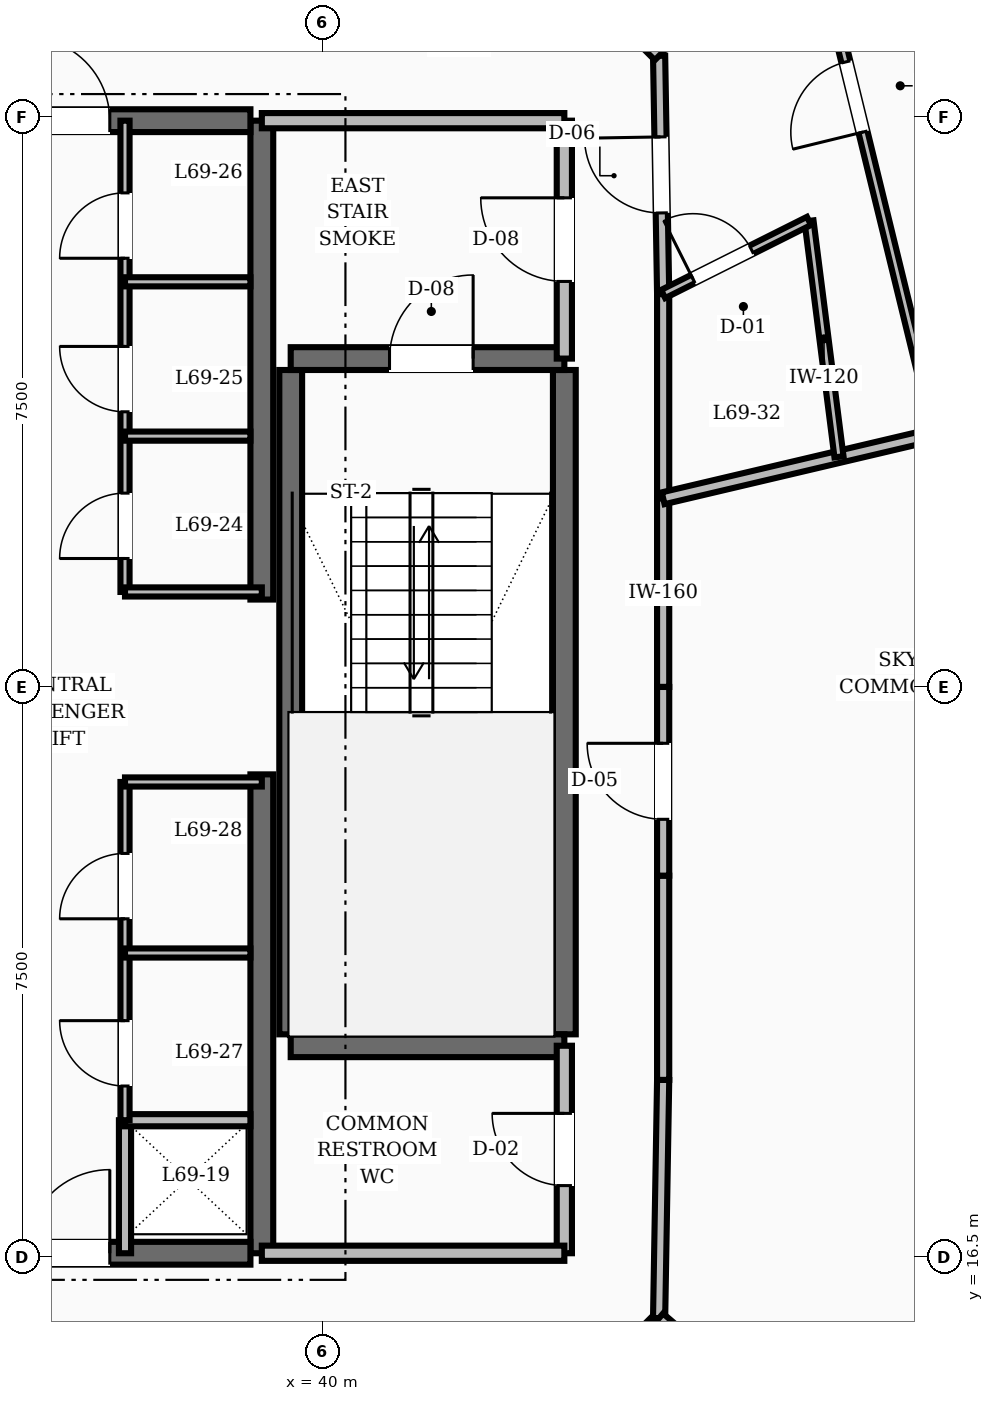
"""IFC4 building model, lengths in metres.
Left out: names, types, materials, properties, quantities, classifications, styles, units other than length and angle.
Written with IfcOpenShell. Run it as: python <this file> out.ifc"""

import sys

from ifc_helpers import new_model, si_unit, direction, frame, frame_2d, origin, place, context, subcontext, project, spatial, rectangle, extrude, element, fill, save


model = new_model("IFC4")
c1 = context("Model", 3, precision=1e-05, world=origin(), true_north=direction((0.0, 1.0)))
c2 = subcontext(c1, "Body", "Model", "MODEL_VIEW")
j1 = project(units=[si_unit("LENGTHUNIT", "METRE"), si_unit("PLANEANGLEUNIT", "RADIAN")], contexts=[c1])
p1 = place(None, origin())
s1 = spatial("IfcSite", under=j1, at=p1, CompositionType="ELEMENT")
p2 = place(p1, origin())
s2 = spatial("IfcBuilding", under=s1, at=p2, CompositionType="ELEMENT")
p3 = place(p2, frame((0.0, 0.0, 265.2)))
s3 = spatial("IfcBuildingStorey", under=s2, at=p3, CompositionType="ELEMENT", Elevation=265.2)
for number, where, z_axis, x_axis in (
    (1, (39.2, 16.55, 0.0), (0.0, 0.0, 1.0), (0.0, 1.0, 0.0)),
    (2, (39.2, 25.15, 0.0), (0.0, 0.0, 1.0), (0.0, 1.0, 0.0)),
):
    element("IfcWall", number, at=place(p3, frame(where, z_axis=z_axis, x_axis=x_axis)), inside=s3, PredefinedType="SHEAR", context=c2, shape_type="SweptSolid", body=[
        extrude(rectangle(XDim=6.3, YDim=0.3, at=frame_2d((3.15, 0.0))), origin(), (0.0, 0.0, 1.0), 3.6),
    ])
p4 = place(p3, frame((35.8, 16.55, 0.0), z_axis=(0.0, 0.0, 1.0), x_axis=(1.0, 0.0, 0.0)))
e3 = element("IfcWall", 3, at=p4, inside=s3, PredefinedType="SHEAR", context=c2, shape_type="SweptSolid", body=[
    extrude(rectangle(XDim=3.25, YDim=0.3, at=frame_2d((1.625, 0.0))), origin(), (0.0, 0.0, 1.0), 3.6),
])
p5 = place(p4, frame((0.3, 0.0, 0.0)))
e4 = element("IfcOpeningElement", 4, at=p5, cuts=e3, PredefinedType="OPENING", context=c2, shape_type="SweptSolid", body=[
    extrude(rectangle(XDim=1.1, YDim=2.1, at=frame_2d((0.55, 1.05))), frame((0.0, 0.16, 0.0), z_axis=(0.0, -1.0, 0.0), x_axis=(1.0, 0.0, 0.0)), (0.0, 0.0, 1.0), 0.32),
])
p6 = place(p3, frame((35.8, 31.45, 0.0), z_axis=(0.0, 0.0, 1.0), x_axis=(1.0, 0.0, 0.0)))
e5 = element("IfcWall", 5, at=p6, inside=s3, PredefinedType="SHEAR", context=c2, shape_type="SweptSolid", body=[
    extrude(rectangle(XDim=3.25, YDim=0.3, at=frame_2d((1.625, 0.0))), origin(), (0.0, 0.0, 1.0), 3.6),
])
p7 = place(p6, frame((0.3, 0.0, 0.0)))
e6 = element("IfcOpeningElement", 6, at=p7, cuts=e5, PredefinedType="OPENING", context=c2, shape_type="SweptSolid", body=[
    extrude(rectangle(XDim=1.1, YDim=2.1, at=frame_2d((0.55, 1.05))), frame((0.0, 0.16, 0.0), z_axis=(0.0, -1.0, 0.0), x_axis=(1.0, 0.0, 0.0)), (0.0, 0.0, 1.0), 0.32),
])
for number, where, z_axis, x_axis in (
    (7, (43.18, 19.43, 0.0), (0.0, 0.0, 1.0), (0.0, 1.0, 0.0)),
    (8, (39.58, 19.43, 0.0), (0.0, 0.0, 1.0), (0.0, 1.0, 0.0)),
):
    element("IfcWall", number, at=place(p3, frame(where, z_axis=z_axis, x_axis=x_axis)), inside=s3, PredefinedType="SHEAR", context=c2, shape_type="SweptSolid", body=[
        extrude(rectangle(XDim=8.74, YDim=0.3, at=frame_2d((4.37, 0.0))), origin(), (0.0, 0.0, 1.0), 3.6),
    ])
p8 = place(p3, frame((39.58, 19.28, 0.0), z_axis=(0.0, 0.0, 1.0), x_axis=(1.0, 0.0, 0.0)))
e9 = element("IfcWall", 9, at=p8, inside=s3, PredefinedType="SHEAR", context=c2, shape_type="SweptSolid", body=[
    extrude(rectangle(XDim=3.6, YDim=0.3, at=frame_2d((1.8, 0.0))), origin(), (0.0, 0.0, 1.0), 3.6),
])
p9 = place(p3, frame((39.58, 28.32, 0.0), z_axis=(0.0, 0.0, 1.0), x_axis=(1.0, 0.0, 0.0)))
e10 = element("IfcWall", 10, at=p9, inside=s3, PredefinedType="SHEAR", context=c2, shape_type="SweptSolid", body=[
    extrude(rectangle(XDim=3.6, YDim=0.3, at=frame_2d((1.8, 0.0))), origin(), (0.0, 0.0, 1.0), 3.6),
])
p10 = place(p9, frame((1.3, 0.0, 0.0)))
e11 = element("IfcOpeningElement", 11, at=p10, cuts=e10, PredefinedType="OPENING", context=c2, shape_type="SweptSolid", body=[
    extrude(rectangle(XDim=1.1, YDim=2.1, at=frame_2d((0.55, 1.05))), frame((0.0, 0.16, 0.0), z_axis=(0.0, -1.0, 0.0), x_axis=(1.0, 0.0, 0.0)), (0.0, 0.0, 1.0), 0.32),
])
p11 = place(p3, frame((43.18, 28.32, 0.0), z_axis=(0.0, 0.0, 1.0), x_axis=(0.0, 1.0, 0.0)))
e12 = element("IfcWall", 12, at=p11, inside=s3, PredefinedType="SOLIDWALL", context=c2, shape_type="SweptSolid", body=[
    extrude(rectangle(XDim=3.13, YDim=0.2, at=frame_2d((1.565, 0.0))), origin(), (0.0, 0.0, 1.0), 2.87),
])
p12 = place(p11, frame((1.015, 0.0, 0.0)))
e13 = element("IfcOpeningElement", 13, at=p12, cuts=e12, PredefinedType="OPENING", context=c2, shape_type="SweptSolid", body=[
    extrude(rectangle(XDim=1.1, YDim=2.1, at=frame_2d((0.55, 1.05))), frame((0.0, 0.11, 0.0), z_axis=(0.0, -1.0, 0.0), x_axis=(1.0, 0.0, 0.0)), (0.0, 0.0, 1.0), 0.22),
])
p13 = place(p3, frame((39.2, 31.45, 0.0), z_axis=(0.0, 0.0, 1.0), x_axis=(1.0, 0.0, 0.0)))
e14 = element("IfcWall", 14, at=p13, inside=s3, PredefinedType="SOLIDWALL", context=c2, shape_type="SweptSolid", body=[
    extrude(rectangle(XDim=3.98, YDim=0.2, at=frame_2d((1.99, 0.0))), origin(), (0.0, 0.0, 1.0), 2.87),
])
p14 = place(p3, frame((43.18, 16.55, 0.0), z_axis=(0.0, 0.0, 1.0), x_axis=(0.0, 1.0, 0.0)))
e15 = element("IfcWall", 15, at=p14, inside=s3, PredefinedType="SOLIDWALL", context=c2, shape_type="SweptSolid", body=[
    extrude(rectangle(XDim=2.73, YDim=0.2, at=frame_2d((1.365, 0.0))), origin(), (0.0, 0.0, 1.0), 2.87),
])
p15 = place(p14, frame((0.89, 0.0, 0.0)))
e16 = element("IfcOpeningElement", 16, at=p15, cuts=e15, PredefinedType="OPENING", context=c2, shape_type="SweptSolid", body=[
    extrude(rectangle(XDim=0.95, YDim=2.1, at=frame_2d((0.475, 1.05))), frame((0.0, 0.11, 0.0), z_axis=(0.0, -1.0, 0.0), x_axis=(1.0, 0.0, 0.0)), (0.0, 0.0, 1.0), 0.22),
])
p16 = place(p3, frame((39.2, 16.55, 0.0), z_axis=(0.0, 0.0, 1.0), x_axis=(1.0, 0.0, 0.0)))
e17 = element("IfcWall", 17, at=p16, inside=s3, PredefinedType="SOLIDWALL", context=c2, shape_type="SweptSolid", body=[
    extrude(rectangle(XDim=3.98, YDim=0.2, at=frame_2d((1.99, 0.0))), origin(), (0.0, 0.0, 1.0), 2.87),
])
p17 = place(p3, frame((37.4, 16.55, 0.0), z_axis=(0.0, 0.0, 1.0), x_axis=(0.0, 1.0, 0.0)))
e18 = element("IfcWall", 18, at=p17, inside=s3, PredefinedType="SOLIDWALL", context=c2, shape_type="SweptSolid", body=[
    extrude(rectangle(XDim=1.75, YDim=0.16, at=frame_2d((0.875, 0.0))), origin(), (0.0, 0.0, 1.0), 2.87),
])
p18 = place(p3, frame((37.4, 18.3, 0.0), z_axis=(0.0, 0.0, 1.0), x_axis=(1.0, 0.0, 0.0)))
e19 = element("IfcWall", 19, at=p18, inside=s3, PredefinedType="SOLIDWALL", context=c2, shape_type="SweptSolid", body=[
    extrude(rectangle(XDim=1.65, YDim=0.16, at=frame_2d((0.825, 0.0))), origin(), (0.0, 0.0, 1.0), 2.87),
])
p19 = place(p3, frame((37.4, 25.25, 0.0), z_axis=(0.0, 0.0, 1.0), x_axis=(0.0, 1.0, 0.0)))
e20 = element("IfcWall", 20, at=p19, inside=s3, PredefinedType="PARTITIONING", context=c2, shape_type="SweptSolid", body=[
    extrude(rectangle(XDim=6.2, YDim=0.12, at=frame_2d((3.1, 0.0))), origin(), (0.0, 0.0, 1.0), 2.87),
])
p20 = place(p19, frame((0.44, 0.0, 0.0)))
e21 = element("IfcOpeningElement", 21, at=p20, cuts=e20, PredefinedType="OPENING", context=c2, shape_type="SweptSolid", body=[
    extrude(rectangle(XDim=0.86, YDim=2.1, at=frame_2d((0.43, 1.05))), frame((0.0, 0.07, 0.0), z_axis=(0.0, -1.0, 0.0), x_axis=(1.0, 0.0, 0.0)), (0.0, 0.0, 1.0), 0.14),
])
p21 = place(p19, frame((2.37, 0.0, 0.0)))
e22 = element("IfcOpeningElement", 22, at=p21, cuts=e20, PredefinedType="OPENING", context=c2, shape_type="SweptSolid", body=[
    extrude(rectangle(XDim=0.86, YDim=2.1, at=frame_2d((0.43, 1.05))), frame((0.0, 0.07, 0.0), z_axis=(0.0, -1.0, 0.0), x_axis=(1.0, 0.0, 0.0)), (0.0, 0.0, 1.0), 0.14),
])
p22 = place(p19, frame((4.39, 0.0, 0.0)))
e23 = element("IfcOpeningElement", 23, at=p22, cuts=e20, PredefinedType="OPENING", context=c2, shape_type="SweptSolid", body=[
    extrude(rectangle(XDim=0.86, YDim=2.1, at=frame_2d((0.43, 1.05))), frame((0.0, 0.07, 0.0), z_axis=(0.0, -1.0, 0.0), x_axis=(1.0, 0.0, 0.0)), (0.0, 0.0, 1.0), 0.14),
])
p23 = place(p3, frame((37.4, 25.25, 0.0), z_axis=(0.0, 0.0, 1.0), x_axis=(1.0, 0.0, 0.0)))
e24 = element("IfcWall", 24, at=p23, inside=s3, PredefinedType="PARTITIONING", context=c2, shape_type="SweptSolid", body=[
    extrude(rectangle(XDim=1.8, YDim=0.12, at=frame_2d((0.9, 0.0))), origin(), (0.0, 0.0, 1.0), 2.87),
])
p24 = place(p3, frame((37.4, 18.3, 0.0), z_axis=(0.0, 0.0, 1.0), x_axis=(0.0, 1.0, 0.0)))
e25 = element("IfcWall", 25, at=p24, inside=s3, PredefinedType="PARTITIONING", context=c2, shape_type="SweptSolid", body=[
    extrude(rectangle(XDim=4.45, YDim=0.12, at=frame_2d((2.225, 0.0))), origin(), (0.0, 0.0, 1.0), 2.87),
])
p25 = place(p24, frame((0.45, 0.0, 0.0)))
e26 = element("IfcOpeningElement", 26, at=p25, cuts=e25, PredefinedType="OPENING", context=c2, shape_type="SweptSolid", body=[
    extrude(rectangle(XDim=0.86, YDim=2.1, at=frame_2d((0.43, 1.05))), frame((0.0, 0.07, 0.0), z_axis=(0.0, -1.0, 0.0), x_axis=(1.0, 0.0, 0.0)), (0.0, 0.0, 1.0), 0.14),
])
p26 = place(p24, frame((2.65, 0.0, 0.0)))
e27 = element("IfcOpeningElement", 27, at=p26, cuts=e25, PredefinedType="OPENING", context=c2, shape_type="SweptSolid", body=[
    extrude(rectangle(XDim=0.86, YDim=2.1, at=frame_2d((0.43, 1.05))), frame((0.0, 0.07, 0.0), z_axis=(0.0, -1.0, 0.0), x_axis=(1.0, 0.0, 0.0)), (0.0, 0.0, 1.0), 0.14),
])
p27 = place(p3, frame((37.4, 22.75, 0.0), z_axis=(0.0, 0.0, 1.0), x_axis=(1.0, 0.0, 0.0)))
e28 = element("IfcWall", 28, at=p27, inside=s3, PredefinedType="PARTITIONING", context=c2, shape_type="SweptSolid", body=[
    extrude(rectangle(XDim=1.8, YDim=0.12, at=frame_2d((0.9, 0.0))), origin(), (0.0, 0.0, 1.0), 2.87),
])
for number, where, z_axis, x_axis in (
    (29, (37.4, 27.3, 0.0), (0.0, 0.0, 1.0), (1.0, 0.0, 0.0)),
    (30, (37.4, 29.33, 0.0), (0.0, 0.0, 1.0), (1.0, 0.0, 0.0)),
    (31, (37.4, 20.5, 0.0), (0.0, 0.0, 1.0), (1.0, 0.0, 0.0)),
):
    element("IfcWall", number, at=place(p3, frame(where, z_axis=z_axis, x_axis=x_axis)), inside=s3, PredefinedType="PARTITIONING", context=c2, shape_type="SweptSolid", body=[
        extrude(rectangle(XDim=1.65, YDim=0.12, at=frame_2d((0.825, 0.0))), origin(), (0.0, 0.0, 1.0), 2.87),
    ])
p28 = place(p3, frame((44.48, 24.0, 0.0), z_axis=(0.0, 0.0, 1.0), x_axis=(0.0, 1.0, 0.0)))
e32 = element("IfcWall", 32, at=p28, inside=s3, PredefinedType="SOLIDWALL", context=c2, shape_type="SweptSolid", body=[
    extrude(rectangle(XDim=2.482, YDim=0.16, at=frame_2d((1.241, 0.0))), origin(), (0.0, 0.0, 1.0), 2.87),
])
p29 = place(p3, frame((44.48, 26.482, 0.0), z_axis=(0.0, 0.0, 1.0), x_axis=(0.0, 1.0, 0.0)))
e33 = element("IfcWall", 33, at=p29, inside=s3, PredefinedType="SOLIDWALL", context=c2, shape_type="SweptSolid", body=[
    extrude(rectangle(XDim=2.687, YDim=0.16, at=frame_2d((1.344, 0.0))), origin(), (0.0, 0.0, 1.0), 2.87),
])
p30 = place(p3, frame((44.48, 29.169, 0.0), z_axis=(0.0, 0.0, 1.0), x_axis=(-0.016981035134, 0.999855811828, 0.0)))
e34 = element("IfcWall", 34, at=p30, inside=s3, PredefinedType="SOLIDWALL", context=c2, shape_type="SweptSolid", body=[
    extrude(rectangle(XDim=3.134, YDim=0.16, at=frame_2d((1.567, 0.0))), origin(), (0.0, 0.0, 1.0), 2.87),
])
p31 = place(p30, frame((1.067, 0.0, 0.0)))
e35 = element("IfcOpeningElement", 35, at=p31, cuts=e34, PredefinedType="OPENING", context=c2, shape_type="SweptSolid", body=[
    extrude(rectangle(XDim=1.0, YDim=2.1, at=frame_2d((0.5, 1.05))), frame((0.0, 0.09, 0.0), z_axis=(0.0, -1.0, 0.0), x_axis=(1.0, 0.0, 0.0)), (0.0, 0.0, 1.0), 0.18),
])
for number, where, z_axis, x_axis in (
    (36, (44.427, 32.303, 0.0), (0.0, 0.0, 1.0), (-0.707, 0.707, 0.0)),
    (37, (42.365, 13.635, 0.0), (0.0, 0.0, 1.0), (0.707, 0.707, 0.0)),
):
    element("IfcWall", number, at=place(p3, frame(where, z_axis=z_axis, x_axis=x_axis)), inside=s3, PredefinedType="SOLIDWALL", context=c2, shape_type="SweptSolid", body=[
        extrude(rectangle(XDim=2.916, YDim=0.16, at=frame_2d((1.458, 0.0))), origin(), (0.0, 0.0, 1.0), 2.87),
    ])
p32 = place(p3, frame((44.427, 15.697, 0.0), z_axis=(0.0, 0.0, 1.0), x_axis=(0.016981035134, 0.999855811828, 0.0)))
e38 = element("IfcWall", 38, at=p32, inside=s3, PredefinedType="SOLIDWALL", context=c2, shape_type="SweptSolid", body=[
    extrude(rectangle(XDim=3.134, YDim=0.16, at=frame_2d((1.567, 0.0))), origin(), (0.0, 0.0, 1.0), 2.87),
])
p33 = place(p3, frame((44.48, 18.831, 0.0), z_axis=(0.0, 0.0, 1.0), x_axis=(0.0, 1.0, 0.0)))
e39 = element("IfcWall", 39, at=p33, inside=s3, PredefinedType="SOLIDWALL", context=c2, shape_type="SweptSolid", body=[
    extrude(rectangle(XDim=2.687, YDim=0.16, at=frame_2d((1.344, 0.0))), origin(), (0.0, 0.0, 1.0), 2.87),
])
p34 = place(p3, frame((44.48, 21.518, 0.0), z_axis=(0.0, 0.0, 1.0), x_axis=(0.0, 1.0, 0.0)))
e40 = element("IfcWall", 40, at=p34, inside=s3, PredefinedType="SOLIDWALL", context=c2, shape_type="SweptSolid", body=[
    extrude(rectangle(XDim=2.482, YDim=0.16, at=frame_2d((1.241, 0.0))), origin(), (0.0, 0.0, 1.0), 2.87),
])
p35 = place(p34, frame((0.741, 0.0, 0.0)))
e41 = element("IfcOpeningElement", 41, at=p35, cuts=e40, PredefinedType="OPENING", context=c2, shape_type="SweptSolid", body=[
    extrude(rectangle(XDim=1.0, YDim=2.1, at=frame_2d((0.5, 1.05))), frame((0.0, 0.09, 0.0), z_axis=(0.0, -1.0, 0.0), x_axis=(1.0, 0.0, 0.0)), (0.0, 0.0, 1.0), 0.18),
])
p36 = place(p3, frame((44.427, 15.697, 0.0), z_axis=(0.0, 0.0, 1.0), x_axis=(0.759954557094, -0.649976208143, 0.0)))
e42 = element("IfcWall", 42, at=p36, inside=s3, PredefinedType="SOLIDWALL", context=c2, shape_type="SweptSolid", body=[
    extrude(rectangle(XDim=4.688, YDim=0.16, at=frame_2d((2.344, 0.0))), origin(), (0.0, 0.0, 1.0), 2.87),
])
p37 = place(p3, frame((44.48, 26.482, 0.0), z_axis=(0.0, 0.0, 1.0), x_axis=(0.973328646979, 0.229415223928, 0.0)))
e43 = element("IfcWall", 43, at=p37, inside=s3, PredefinedType="SOLIDWALL", context=c2, shape_type="SweptSolid", body=[
    extrude(rectangle(XDim=6.552, YDim=0.16, at=frame_2d((3.276, 0.0))), origin(), (0.0, 0.0, 1.0), 2.87),
])
p38 = place(p3, frame((46.793, 27.028, 0.0), z_axis=(0.0, 0.0, 1.0), x_axis=(-0.126262657016, 0.99199684548, 0.0)))
e44 = element("IfcWall", 44, at=p38, inside=s3, PredefinedType="PARTITIONING", context=c2, shape_type="SweptSolid", body=[
    extrude(rectangle(XDim=3.129, YDim=0.12, at=frame_2d((1.564, 0.0))), origin(), (0.0, 0.0, 1.0), 2.87),
])
p39 = place(p3, frame((44.48, 29.169, 0.0), z_axis=(0.0, 0.0, 1.0), x_axis=(0.893971664745, 0.448123490383, 0.0)))
e45 = element("IfcWall", 45, at=p39, inside=s3, PredefinedType="PARTITIONING", context=c2, shape_type="SweptSolid", body=[
    extrude(rectangle(XDim=2.146, YDim=0.12, at=frame_2d((1.073, 0.0))), origin(), (0.0, 0.0, 1.0), 2.87),
])
p40 = place(p39, frame((0.44, 0.0, 0.0)))
e46 = element("IfcOpeningElement", 46, at=p40, cuts=e45, PredefinedType="OPENING", context=c2, shape_type="SweptSolid", body=[
    extrude(rectangle(XDim=0.86, YDim=2.1, at=frame_2d((0.43, 1.05))), frame((0.0, 0.07, 0.0), z_axis=(0.0, -1.0, 0.0), x_axis=(1.0, 0.0, 0.0)), (0.0, 0.0, 1.0), 0.14),
])
p41 = place(p3, frame((48.079, 27.331, 0.0), z_axis=(0.0, 0.0, 1.0), x_axis=(-0.237199115633, 0.971461054054, 0.0)))
e47 = element("IfcWall", 47, at=p41, inside=s3, PredefinedType="PARTITIONING", context=c2, shape_type="SweptSolid", body=[
    extrude(rectangle(XDim=6.894, YDim=0.12, at=frame_2d((3.447, 0.0))), origin(), (0.0, 0.0, 1.0), 2.87),
])
p42 = place(p41, frame((4.086, 0.0, 0.0)))
e48 = element("IfcOpeningElement", 48, at=p42, cuts=e47, PredefinedType="OPENING", context=c2, shape_type="SweptSolid", body=[
    extrude(rectangle(XDim=0.95, YDim=2.1, at=frame_2d((0.475, 1.05))), frame((0.0, 0.07, 0.0), z_axis=(0.0, -1.0, 0.0), x_axis=(1.0, 0.0, 0.0)), (0.0, 0.0, 1.0), 0.14),
])
p43 = place(p10, origin())
e49 = element("IfcDoor", 49, at=p43, inside=s3, OperationType="SINGLE_SWING_RIGHT", PredefinedType="DOOR", context=c2, shape_type="SweptSolid", body=[
    extrude(rectangle(XDim=1.1, YDim=2.1, at=frame_2d((0.55, 1.05))), frame((0.0, 0.025, 0.0), z_axis=(0.0, -1.0, 0.0), x_axis=(1.0, 0.0, 0.0)), (0.0, 0.0, 1.0), 0.05),
])
fill(e11, e49)
p44 = place(p12, origin())
e50 = element("IfcDoor", 50, at=p44, inside=s3, OperationType="SINGLE_SWING_RIGHT", PredefinedType="DOOR", context=c2, shape_type="SweptSolid", body=[
    extrude(rectangle(XDim=1.1, YDim=2.1, at=frame_2d((0.55, 1.05))), frame((0.0, 0.025, 0.0), z_axis=(0.0, -1.0, 0.0), x_axis=(1.0, 0.0, 0.0)), (0.0, 0.0, 1.0), 0.05),
])
fill(e13, e50)
p45 = place(p15, origin())
e51 = element("IfcDoor", 51, at=p45, inside=s3, OperationType="SINGLE_SWING_RIGHT", PredefinedType="DOOR", context=c2, shape_type="SweptSolid", body=[
    extrude(rectangle(XDim=0.95, YDim=2.1, at=frame_2d((0.475, 1.05))), frame((0.0, 0.025, 0.0), z_axis=(0.0, -1.0, 0.0), x_axis=(1.0, 0.0, 0.0)), (0.0, 0.0, 1.0), 0.05),
])
fill(e16, e51)
p46 = place(p7, origin())
e52 = element("IfcDoor", 52, at=p46, inside=s3, OperationType="SINGLE_SWING_LEFT", PredefinedType="DOOR", context=c2, shape_type="SweptSolid", body=[
    extrude(rectangle(XDim=1.1, YDim=2.1, at=frame_2d((0.55, 1.05))), frame((0.0, 0.025, 0.0), z_axis=(0.0, -1.0, 0.0), x_axis=(1.0, 0.0, 0.0)), (0.0, 0.0, 1.0), 0.05),
])
fill(e6, e52)
p47 = place(p5, origin())
e53 = element("IfcDoor", 53, at=p47, inside=s3, OperationType="SINGLE_SWING_RIGHT", PredefinedType="DOOR", context=c2, shape_type="SweptSolid", body=[
    extrude(rectangle(XDim=1.1, YDim=2.1, at=frame_2d((0.55, 1.05))), frame((0.0, 0.025, 0.0), z_axis=(0.0, -1.0, 0.0), x_axis=(1.0, 0.0, 0.0)), (0.0, 0.0, 1.0), 0.05),
])
fill(e4, e53)
p48 = place(p20, origin())
e54 = element("IfcDoor", 54, at=p48, inside=s3, OperationType="SINGLE_SWING_LEFT", PredefinedType="DOOR", context=c2, shape_type="SweptSolid", body=[
    extrude(rectangle(XDim=0.86, YDim=2.1, at=frame_2d((0.43, 1.05))), frame((0.0, 0.025, 0.0), z_axis=(0.0, -1.0, 0.0), x_axis=(1.0, 0.0, 0.0)), (0.0, 0.0, 1.0), 0.05),
])
fill(e21, e54)
p49 = place(p21, origin())
e55 = element("IfcDoor", 55, at=p49, inside=s3, OperationType="SINGLE_SWING_RIGHT", PredefinedType="DOOR", context=c2, shape_type="SweptSolid", body=[
    extrude(rectangle(XDim=0.86, YDim=2.1, at=frame_2d((0.43, 1.05))), frame((0.0, 0.025, 0.0), z_axis=(0.0, -1.0, 0.0), x_axis=(1.0, 0.0, 0.0)), (0.0, 0.0, 1.0), 0.05),
])
fill(e22, e55)
p50 = place(p22, origin())
e56 = element("IfcDoor", 56, at=p50, inside=s3, OperationType="SINGLE_SWING_LEFT", PredefinedType="DOOR", context=c2, shape_type="SweptSolid", body=[
    extrude(rectangle(XDim=0.86, YDim=2.1, at=frame_2d((0.43, 1.05))), frame((0.0, 0.025, 0.0), z_axis=(0.0, -1.0, 0.0), x_axis=(1.0, 0.0, 0.0)), (0.0, 0.0, 1.0), 0.05),
])
fill(e23, e56)
p51 = place(p25, origin())
e57 = element("IfcDoor", 57, at=p51, inside=s3, OperationType="SINGLE_SWING_RIGHT", PredefinedType="DOOR", context=c2, shape_type="SweptSolid", body=[
    extrude(rectangle(XDim=0.86, YDim=2.1, at=frame_2d((0.43, 1.05))), frame((0.0, 0.025, 0.0), z_axis=(0.0, -1.0, 0.0), x_axis=(1.0, 0.0, 0.0)), (0.0, 0.0, 1.0), 0.05),
])
fill(e26, e57)
p52 = place(p26, origin())
e58 = element("IfcDoor", 58, at=p52, inside=s3, OperationType="SINGLE_SWING_LEFT", PredefinedType="DOOR", context=c2, shape_type="SweptSolid", body=[
    extrude(rectangle(XDim=0.86, YDim=2.1, at=frame_2d((0.43, 1.05))), frame((0.0, 0.025, 0.0), z_axis=(0.0, -1.0, 0.0), x_axis=(1.0, 0.0, 0.0)), (0.0, 0.0, 1.0), 0.05),
])
fill(e27, e58)
p53 = place(p35, origin())
e59 = element("IfcDoor", 59, at=p53, inside=s3, OperationType="SINGLE_SWING_RIGHT", PredefinedType="DOOR", context=c2, shape_type="SweptSolid", body=[
    extrude(rectangle(XDim=1.0, YDim=2.1, at=frame_2d((0.5, 1.05))), frame((0.0, 0.025, 0.0), z_axis=(0.0, -1.0, 0.0), x_axis=(1.0, 0.0, 0.0)), (0.0, 0.0, 1.0), 0.05),
])
fill(e41, e59)
p54 = place(p40, origin())
e60 = element("IfcDoor", 60, at=p54, inside=s3, OperationType="SINGLE_SWING_LEFT", PredefinedType="DOOR", context=c2, shape_type="SweptSolid", body=[
    extrude(rectangle(XDim=0.86, YDim=2.1, at=frame_2d((0.43, 1.05))), frame((0.0, 0.025, 0.0), z_axis=(0.0, -1.0, 0.0), x_axis=(1.0, 0.0, 0.0)), (0.0, 0.0, 1.0), 0.05),
])
fill(e46, e60)
p55 = place(p31, origin())
e61 = element("IfcDoor", 61, at=p55, inside=s3, OperationType="SINGLE_SWING_RIGHT", PredefinedType="DOOR", context=c2, shape_type="SweptSolid", body=[
    extrude(rectangle(XDim=1.0, YDim=2.1, at=frame_2d((0.5, 1.05))), frame((0.0, 0.025, 0.0), z_axis=(0.0, -1.0, 0.0), x_axis=(1.0, 0.0, 0.0)), (0.0, 0.0, 1.0), 0.05),
])
fill(e35, e61)
p56 = place(p42, origin())
e62 = element("IfcDoor", 62, at=p56, inside=s3, OperationType="SINGLE_SWING_LEFT", PredefinedType="DOOR", context=c2, shape_type="SweptSolid", body=[
    extrude(rectangle(XDim=0.95, YDim=2.1, at=frame_2d((0.475, 1.05))), frame((0.0, 0.025, 0.0), z_axis=(0.0, -1.0, 0.0), x_axis=(1.0, 0.0, 0.0)), (0.0, 0.0, 1.0), 0.05),
])
fill(e48, e62)
save(model, sys.argv[1])
